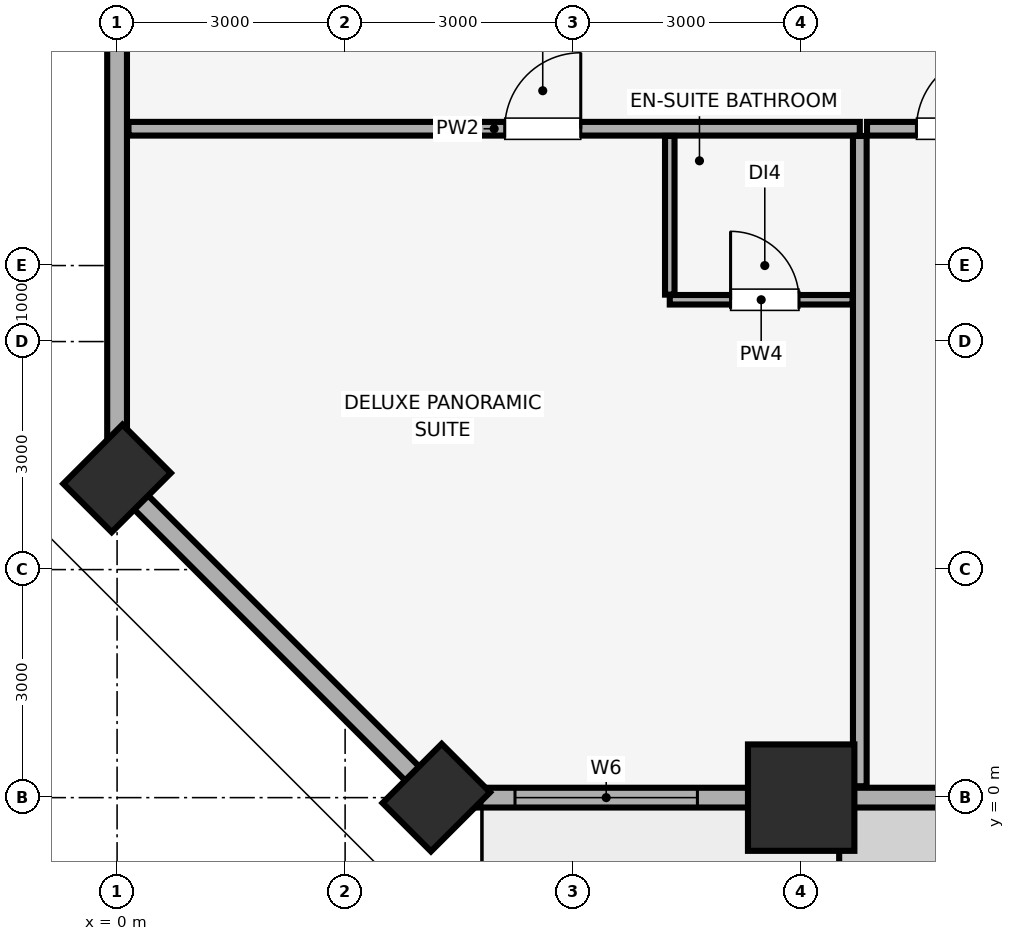
"""IFC4 building model, lengths in metres.
Left out: names, types, materials, properties, quantities, classifications, styles, units other than length and angle.
Written with IfcOpenShell. Run it as: python <this file> out.ifc"""

import sys

from ifc_helpers import new_model, si_unit, direction, frame, frame_2d, origin, origin_2d, place, context, subcontext, project, spatial, rectangle, extrude, element, fill, save


model = new_model("IFC4")
c1 = context("Model", 3, precision=1e-05, world=origin(), true_north=direction((0.0, 1.0)))
c2 = subcontext(c1, "Body", "Model", "MODEL_VIEW")
j1 = project(units=[si_unit("LENGTHUNIT", "METRE"), si_unit("PLANEANGLEUNIT", "RADIAN")], contexts=[c1])
p1 = place(None, origin())
s1 = spatial("IfcSite", under=j1, at=p1, CompositionType="ELEMENT")
p2 = place(p1, origin())
s2 = spatial("IfcBuilding", under=s1, at=p2, CompositionType="ELEMENT")
p3 = place(p2, frame((0.0, 0.0, 35.15)))
s3 = spatial("IfcBuildingStorey", under=s2, at=p3, CompositionType="ELEMENT", Elevation=35.15)
p4 = place(p3, frame((9.0, 0.0, 0.0), z_axis=(0.0, 0.0, 1.0), x_axis=(1.0, 0.0, 0.0)))
e1 = element("IfcColumn", 1, at=p4, inside=s3, PredefinedType="COLUMN", context=c2, shape_type="SweptSolid", body=[
    extrude(rectangle(XDim=1.4, YDim=1.4, at=origin_2d()), origin(), (0.0, 0.0, 1.0), 3.51),
])
for number, where, z_axis, x_axis in (
    (2, (4.2, 0.0, 0.0), (0.0, 0.0, 1.0), (0.707, 0.707, 0.0)),
    (3, (0.0, 4.2, 0.0), (0.0, 0.0, 1.0), (0.707, 0.707, 0.0)),
):
    element("IfcColumn", number, at=place(p3, frame(where, z_axis=z_axis, x_axis=x_axis)), inside=s3, PredefinedType="PILASTER", context=c2, shape_type="SweptSolid", body=[
        extrude(rectangle(XDim=1.1, YDim=0.9, at=origin_2d()), origin(), (0.0, 0.0, 1.0), 3.51),
    ])
p5 = place(p3, frame((4.2, 0.0, 0.0), z_axis=(0.0, 0.0, 1.0), x_axis=(1.0, 0.0, 0.0)))
e4 = element("IfcWall", 4, at=p5, inside=s3, PredefinedType="SOLIDWALL", context=c2, shape_type="SweptSolid", body=[
    extrude(rectangle(XDim=75.6, YDim=0.26, at=frame_2d((37.8, 0.0))), origin(), (0.0, 0.0, 1.0), 2.56),
])
p6 = place(p5, frame((13.517, 0.0, 0.0)))
e5 = element("IfcOpeningElement", 5, at=p6, cuts=e4, PredefinedType="OPENING", context=c2, shape_type="SweptSolid", body=[
    extrude(rectangle(XDim=1.1, YDim=2.15, at=frame_2d((0.55, 1.075))), frame((0.0, 0.14, 0.0), z_axis=(0.0, -1.0, 0.0), x_axis=(1.0, 0.0, 0.0)), (0.0, 0.0, 1.0), 0.28),
])
p7 = place(p5, frame((28.183, 0.0, 0.0)))
e6 = element("IfcOpeningElement", 6, at=p7, cuts=e4, PredefinedType="OPENING", context=c2, shape_type="SweptSolid", body=[
    extrude(rectangle(XDim=1.1, YDim=2.15, at=frame_2d((0.55, 1.075))), frame((0.0, 0.14, 0.0), z_axis=(0.0, -1.0, 0.0), x_axis=(1.0, 0.0, 0.0)), (0.0, 0.0, 1.0), 0.28),
])
p8 = place(p5, frame((60.983, 0.0, 0.0)))
e7 = element("IfcOpeningElement", 7, at=p8, cuts=e4, PredefinedType="OPENING", context=c2, shape_type="SweptSolid", body=[
    extrude(rectangle(XDim=1.1, YDim=2.15, at=frame_2d((0.55, 1.075))), frame((0.0, 0.14, 0.0), z_axis=(0.0, -1.0, 0.0), x_axis=(1.0, 0.0, 0.0)), (0.0, 0.0, 1.0), 0.28),
])
p9 = place(p5, frame((1.035, 0.0, 0.85)))
e8 = element("IfcOpeningElement", 8, at=p9, cuts=e4, PredefinedType="OPENING", context=c2, shape_type="SweptSolid", body=[
    extrude(rectangle(XDim=2.4, YDim=1.5, at=frame_2d((1.2, 0.75))), frame((0.0, 0.14, 0.0), z_axis=(0.0, -1.0, 0.0), x_axis=(1.0, 0.0, 0.0)), (0.0, 0.0, 1.0), 0.28),
])
p10 = place(p5, frame((7.031, 0.0, 0.85)))
e9 = element("IfcOpeningElement", 9, at=p10, cuts=e4, PredefinedType="OPENING", context=c2, shape_type="SweptSolid", body=[
    extrude(rectangle(XDim=2.4, YDim=1.5, at=frame_2d((1.2, 0.75))), frame((0.0, 0.14, 0.0), z_axis=(0.0, -1.0, 0.0), x_axis=(1.0, 0.0, 0.0)), (0.0, 0.0, 1.0), 0.28),
])
p11 = place(p5, frame((16.757, 0.0, 0.85)))
e10 = element("IfcOpeningElement", 10, at=p11, cuts=e4, PredefinedType="OPENING", context=c2, shape_type="SweptSolid", body=[
    extrude(rectangle(XDim=1.5, YDim=1.4, at=frame_2d((0.75, 0.7))), frame((0.0, 0.14, 0.0), z_axis=(0.0, -1.0, 0.0), x_axis=(1.0, 0.0, 0.0)), (0.0, 0.0, 1.0), 0.28),
])
p12 = place(p5, frame((22.567, 0.0, 0.85)))
e11 = element("IfcOpeningElement", 11, at=p12, cuts=e4, PredefinedType="OPENING", context=c2, shape_type="SweptSolid", body=[
    extrude(rectangle(XDim=2.4, YDim=1.5, at=frame_2d((1.2, 0.75))), frame((0.0, 0.14, 0.0), z_axis=(0.0, -1.0, 0.0), x_axis=(1.0, 0.0, 0.0)), (0.0, 0.0, 1.0), 0.28),
])
p13 = place(p5, frame((30.065, 0.0, 0.85)))
e12 = element("IfcOpeningElement", 12, at=p13, cuts=e4, PredefinedType="OPENING", context=c2, shape_type="SweptSolid", body=[
    extrude(rectangle(XDim=1.5, YDim=1.4, at=frame_2d((0.75, 0.7))), frame((0.0, 0.14, 0.0), z_axis=(0.0, -1.0, 0.0), x_axis=(1.0, 0.0, 0.0)), (0.0, 0.0, 1.0), 0.28),
])
p14 = place(p5, frame((34.55, 0.0, 0.85)))
e13 = element("IfcOpeningElement", 13, at=p14, cuts=e4, PredefinedType="OPENING", context=c2, shape_type="SweptSolid", body=[
    extrude(rectangle(XDim=2.4, YDim=1.5, at=frame_2d((1.2, 0.75))), frame((0.0, 0.14, 0.0), z_axis=(0.0, -1.0, 0.0), x_axis=(1.0, 0.0, 0.0)), (0.0, 0.0, 1.0), 0.28),
])
p15 = place(p5, frame((38.35, 0.0, 0.85)))
e14 = element("IfcOpeningElement", 14, at=p15, cuts=e4, PredefinedType="OPENING", context=c2, shape_type="SweptSolid", body=[
    extrude(rectangle(XDim=2.4, YDim=1.5, at=frame_2d((1.2, 0.75))), frame((0.0, 0.14, 0.0), z_axis=(0.0, -1.0, 0.0), x_axis=(1.0, 0.0, 0.0)), (0.0, 0.0, 1.0), 0.28),
])
p16 = place(p5, frame((44.281, 0.0, 0.85)))
e15 = element("IfcOpeningElement", 15, at=p16, cuts=e4, PredefinedType="OPENING", context=c2, shape_type="SweptSolid", body=[
    extrude(rectangle(XDim=2.4, YDim=1.5, at=frame_2d((1.2, 0.75))), frame((0.0, 0.14, 0.0), z_axis=(0.0, -1.0, 0.0), x_axis=(1.0, 0.0, 0.0)), (0.0, 0.0, 1.0), 0.28),
])
p17 = place(p5, frame((50.332, 0.0, 0.85)))
e16 = element("IfcOpeningElement", 16, at=p17, cuts=e4, PredefinedType="OPENING", context=c2, shape_type="SweptSolid", body=[
    extrude(rectangle(XDim=2.4, YDim=1.5, at=frame_2d((1.2, 0.75))), frame((0.0, 0.14, 0.0), z_axis=(0.0, -1.0, 0.0), x_axis=(1.0, 0.0, 0.0)), (0.0, 0.0, 1.0), 0.28),
])
p18 = place(p5, frame((53.981, 0.0, 0.85)))
e17 = element("IfcOpeningElement", 17, at=p18, cuts=e4, PredefinedType="OPENING", context=c2, shape_type="SweptSolid", body=[
    extrude(rectangle(XDim=1.5, YDim=1.4, at=frame_2d((0.75, 0.7))), frame((0.0, 0.14, 0.0), z_axis=(0.0, -1.0, 0.0), x_axis=(1.0, 0.0, 0.0)), (0.0, 0.0, 1.0), 0.28),
])
p19 = place(p5, frame((64.759, 0.0, 0.85)))
e18 = element("IfcOpeningElement", 18, at=p19, cuts=e4, PredefinedType="OPENING", context=c2, shape_type="SweptSolid", body=[
    extrude(rectangle(XDim=1.5, YDim=1.4, at=frame_2d((0.75, 0.7))), frame((0.0, 0.14, 0.0), z_axis=(0.0, -1.0, 0.0), x_axis=(1.0, 0.0, 0.0)), (0.0, 0.0, 1.0), 0.28),
])
p20 = place(p5, frame((67.509, 0.0, 0.85)))
e19 = element("IfcOpeningElement", 19, at=p20, cuts=e4, PredefinedType="OPENING", context=c2, shape_type="SweptSolid", body=[
    extrude(rectangle(XDim=2.4, YDim=1.5, at=frame_2d((1.2, 0.75))), frame((0.0, 0.14, 0.0), z_axis=(0.0, -1.0, 0.0), x_axis=(1.0, 0.0, 0.0)), (0.0, 0.0, 1.0), 0.28),
])
p21 = place(p5, frame((72.165, 0.0, 0.85)))
e20 = element("IfcOpeningElement", 20, at=p21, cuts=e4, PredefinedType="OPENING", context=c2, shape_type="SweptSolid", body=[
    extrude(rectangle(XDim=2.4, YDim=1.5, at=frame_2d((1.2, 0.75))), frame((0.0, 0.14, 0.0), z_axis=(0.0, -1.0, 0.0), x_axis=(1.0, 0.0, 0.0)), (0.0, 0.0, 1.0), 0.28),
])
p22 = place(p3, frame((0.0, 44.8, 0.0), z_axis=(0.0, 0.0, 1.0), x_axis=(0.0, -1.0, 0.0)))
e21 = element("IfcWall", 21, at=p22, inside=s3, PredefinedType="SOLIDWALL", context=c2, shape_type="SweptSolid", body=[
    extrude(rectangle(XDim=40.6, YDim=0.26, at=frame_2d((20.3, 0.0))), origin(), (0.0, 0.0, 1.0), 2.56),
])
p23 = place(p22, frame((31.425, 0.0, 0.85)))
e22 = element("IfcOpeningElement", 22, at=p23, cuts=e21, PredefinedType="OPENING", context=c2, shape_type="SweptSolid", body=[
    extrude(rectangle(XDim=1.5, YDim=1.4, at=frame_2d((0.75, 0.7))), frame((0.0, 0.14, 0.0), z_axis=(0.0, -1.0, 0.0), x_axis=(1.0, 0.0, 0.0)), (0.0, 0.0, 1.0), 0.28),
])
p24 = place(p22, frame((26.34, 0.0, 0.85)))
e23 = element("IfcOpeningElement", 23, at=p24, cuts=e21, PredefinedType="OPENING", context=c2, shape_type="SweptSolid", body=[
    extrude(rectangle(XDim=1.5, YDim=1.4, at=frame_2d((0.75, 0.7))), frame((0.0, 0.14, 0.0), z_axis=(0.0, -1.0, 0.0), x_axis=(1.0, 0.0, 0.0)), (0.0, 0.0, 1.0), 0.28),
])
p25 = place(p22, frame((19.54, 0.0, 0.85)))
e24 = element("IfcOpeningElement", 24, at=p25, cuts=e21, PredefinedType="OPENING", context=c2, shape_type="SweptSolid", body=[
    extrude(rectangle(XDim=1.5, YDim=1.4, at=frame_2d((0.75, 0.7))), frame((0.0, 0.14, 0.0), z_axis=(0.0, -1.0, 0.0), x_axis=(1.0, 0.0, 0.0)), (0.0, 0.0, 1.0), 0.28),
])
p26 = place(p22, frame((11.05, 0.0, 0.85)))
e25 = element("IfcOpeningElement", 25, at=p26, cuts=e21, PredefinedType="OPENING", context=c2, shape_type="SweptSolid", body=[
    extrude(rectangle(XDim=1.5, YDim=1.4, at=frame_2d((0.75, 0.7))), frame((0.0, 0.14, 0.0), z_axis=(0.0, -1.0, 0.0), x_axis=(1.0, 0.0, 0.0)), (0.0, 0.0, 1.0), 0.28),
])
p27 = place(p22, frame((6.35, 0.0, 0.85)))
e26 = element("IfcOpeningElement", 26, at=p27, cuts=e21, PredefinedType="OPENING", context=c2, shape_type="SweptSolid", body=[
    extrude(rectangle(XDim=1.5, YDim=1.4, at=frame_2d((0.75, 0.7))), frame((0.0, 0.14, 0.0), z_axis=(0.0, -1.0, 0.0), x_axis=(1.0, 0.0, 0.0)), (0.0, 0.0, 1.0), 0.28),
])
p28 = place(p22, frame((1.735, 0.0, 0.85)))
e27 = element("IfcOpeningElement", 27, at=p28, cuts=e21, PredefinedType="OPENING", context=c2, shape_type="SweptSolid", body=[
    extrude(rectangle(XDim=1.5, YDim=1.4, at=frame_2d((0.75, 0.7))), frame((0.0, 0.14, 0.0), z_axis=(0.0, -1.0, 0.0), x_axis=(1.0, 0.0, 0.0)), (0.0, 0.0, 1.0), 0.28),
])
p29 = place(p3, frame((0.0, 4.2, 0.0), z_axis=(0.0, 0.0, 1.0), x_axis=(0.707106781187, -0.707106781187, 0.0)))
e28 = element("IfcWall", 28, at=p29, inside=s3, PredefinedType="SOLIDWALL", context=c2, shape_type="SweptSolid", body=[
    extrude(rectangle(XDim=5.94, YDim=0.26, at=frame_2d((2.97, 0.0))), origin(), (0.0, 0.0, 1.0), 2.56),
])
p30 = place(p3, frame((0.15, 8.8, 0.0), z_axis=(0.0, 0.0, 1.0), x_axis=(1.0, 0.0, 0.0)))
e29 = element("IfcWall", 29, at=p30, inside=s3, PredefinedType="PARTITIONING", context=c2, shape_type="SweptSolid", body=[
    extrude(rectangle(XDim=9.621, YDim=0.18, at=frame_2d((4.811, 0.0))), origin(), (0.0, 0.0, 1.0), 3.51),
])
p31 = place(p30, frame((4.95, 0.0, 0.0)))
e30 = element("IfcOpeningElement", 30, at=p31, cuts=e29, PredefinedType="OPENING", context=c2, shape_type="SweptSolid", body=[
    extrude(rectangle(XDim=1.0, YDim=2.15, at=frame_2d((0.5, 1.075))), frame((0.0, 0.1, 0.0), z_axis=(0.0, -1.0, 0.0), x_axis=(1.0, 0.0, 0.0)), (0.0, 0.0, 1.0), 0.2),
])
p32 = place(p3, frame((9.771, 0.15, 0.0), z_axis=(0.0, 0.0, 1.0), x_axis=(0.0, 1.0, 0.0)))
e31 = element("IfcWall", 31, at=p32, inside=s3, PredefinedType="PARTITIONING", context=c2, shape_type="SweptSolid", body=[
    extrude(rectangle(XDim=8.555, YDim=0.18, at=frame_2d((4.278, 0.0))), origin(), (0.0, 0.0, 1.0), 3.51),
])
p33 = place(p3, frame((7.271, 6.55, 0.0), z_axis=(0.0, 0.0, 1.0), x_axis=(1.0, 0.0, 0.0)))
e32 = element("IfcWall", 32, at=p33, inside=s3, PredefinedType="PARTITIONING", context=c2, shape_type="SweptSolid", body=[
    extrude(rectangle(XDim=2.405, YDim=0.125, at=frame_2d((1.203, 0.0))), origin(), (0.0, 0.0, 1.0), 3.51),
])
p34 = place(p33, frame((0.8, 0.0, 0.0)))
e33 = element("IfcOpeningElement", 33, at=p34, cuts=e32, PredefinedType="OPENING", context=c2, shape_type="SweptSolid", body=[
    extrude(rectangle(XDim=0.9, YDim=2.1, at=frame_2d((0.45, 1.05))), frame((0.0, 0.073, 0.0), z_axis=(0.0, -1.0, 0.0), x_axis=(1.0, 0.0, 0.0)), (0.0, 0.0, 1.0), 0.145),
])
p35 = place(p3, frame((7.271, 6.617, 0.0), z_axis=(0.0, 0.0, 1.0), x_axis=(0.0, 1.0, 0.0)))
e34 = element("IfcWall", 34, at=p35, inside=s3, PredefinedType="PARTITIONING", context=c2, shape_type="SweptSolid", body=[
    extrude(rectangle(XDim=2.088, YDim=0.125, at=frame_2d((1.044, 0.0))), origin(), (0.0, 0.0, 1.0), 3.51),
])
p36 = place(p3, frame((9.866, 8.8, 0.0), z_axis=(0.0, 0.0, 1.0), x_axis=(1.0, 0.0, 0.0)))
e35 = element("IfcWall", 35, at=p36, inside=s3, PredefinedType="PARTITIONING", context=c2, shape_type="SweptSolid", body=[
    extrude(rectangle(XDim=5.226, YDim=0.18, at=frame_2d((2.613, 0.0))), origin(), (0.0, 0.0, 1.0), 3.51),
])
p37 = place(p36, frame((0.65, 0.0, 0.0)))
e36 = element("IfcOpeningElement", 36, at=p37, cuts=e35, PredefinedType="OPENING", context=c2, shape_type="SweptSolid", body=[
    extrude(rectangle(XDim=1.0, YDim=2.15, at=frame_2d((0.5, 1.075))), frame((0.0, 0.1, 0.0), z_axis=(0.0, -1.0, 0.0), x_axis=(1.0, 0.0, 0.0)), (0.0, 0.0, 1.0), 0.2),
])
p38 = place(p9, origin())
e37 = element("IfcWindow", 37, at=p38, inside=s3, PartitioningType="SINGLE_PANEL", PredefinedType="WINDOW", context=c2, shape_type="SweptSolid", body=[
    extrude(rectangle(XDim=2.4, YDim=1.5, at=frame_2d((1.2, 0.75))), frame((0.0, 0.03, 0.0), z_axis=(0.0, -1.0, 0.0), x_axis=(1.0, 0.0, 0.0)), (0.0, 0.0, 1.0), 0.06),
])
fill(e8, e37)
p39 = place(p31, origin())
e38 = element("IfcDoor", 38, at=p39, inside=s3, OperationType="SINGLE_SWING_RIGHT", PredefinedType="DOOR", context=c2, shape_type="SweptSolid", body=[
    extrude(rectangle(XDim=1.0, YDim=2.15, at=frame_2d((0.5, 1.075))), frame((0.0, 0.025, 0.0), z_axis=(0.0, -1.0, 0.0), x_axis=(1.0, 0.0, 0.0)), (0.0, 0.0, 1.0), 0.05),
])
fill(e30, e38)
p40 = place(p34, origin())
e39 = element("IfcDoor", 39, at=p40, inside=s3, OperationType="SINGLE_SWING_LEFT", PredefinedType="DOOR", context=c2, shape_type="SweptSolid", body=[
    extrude(rectangle(XDim=0.9, YDim=2.1, at=frame_2d((0.45, 1.05))), frame((0.0, 0.025, 0.0), z_axis=(0.0, -1.0, 0.0), x_axis=(1.0, 0.0, 0.0)), (0.0, 0.0, 1.0), 0.05),
])
fill(e33, e39)
p41 = place(p37, origin())
e40 = element("IfcDoor", 40, at=p41, inside=s3, OperationType="SINGLE_SWING_RIGHT", PredefinedType="DOOR", context=c2, shape_type="SweptSolid", body=[
    extrude(rectangle(XDim=1.0, YDim=2.15, at=frame_2d((0.5, 1.075))), frame((0.0, 0.025, 0.0), z_axis=(0.0, -1.0, 0.0), x_axis=(1.0, 0.0, 0.0)), (0.0, 0.0, 1.0), 0.05),
])
fill(e36, e40)
save(model, sys.argv[1])
